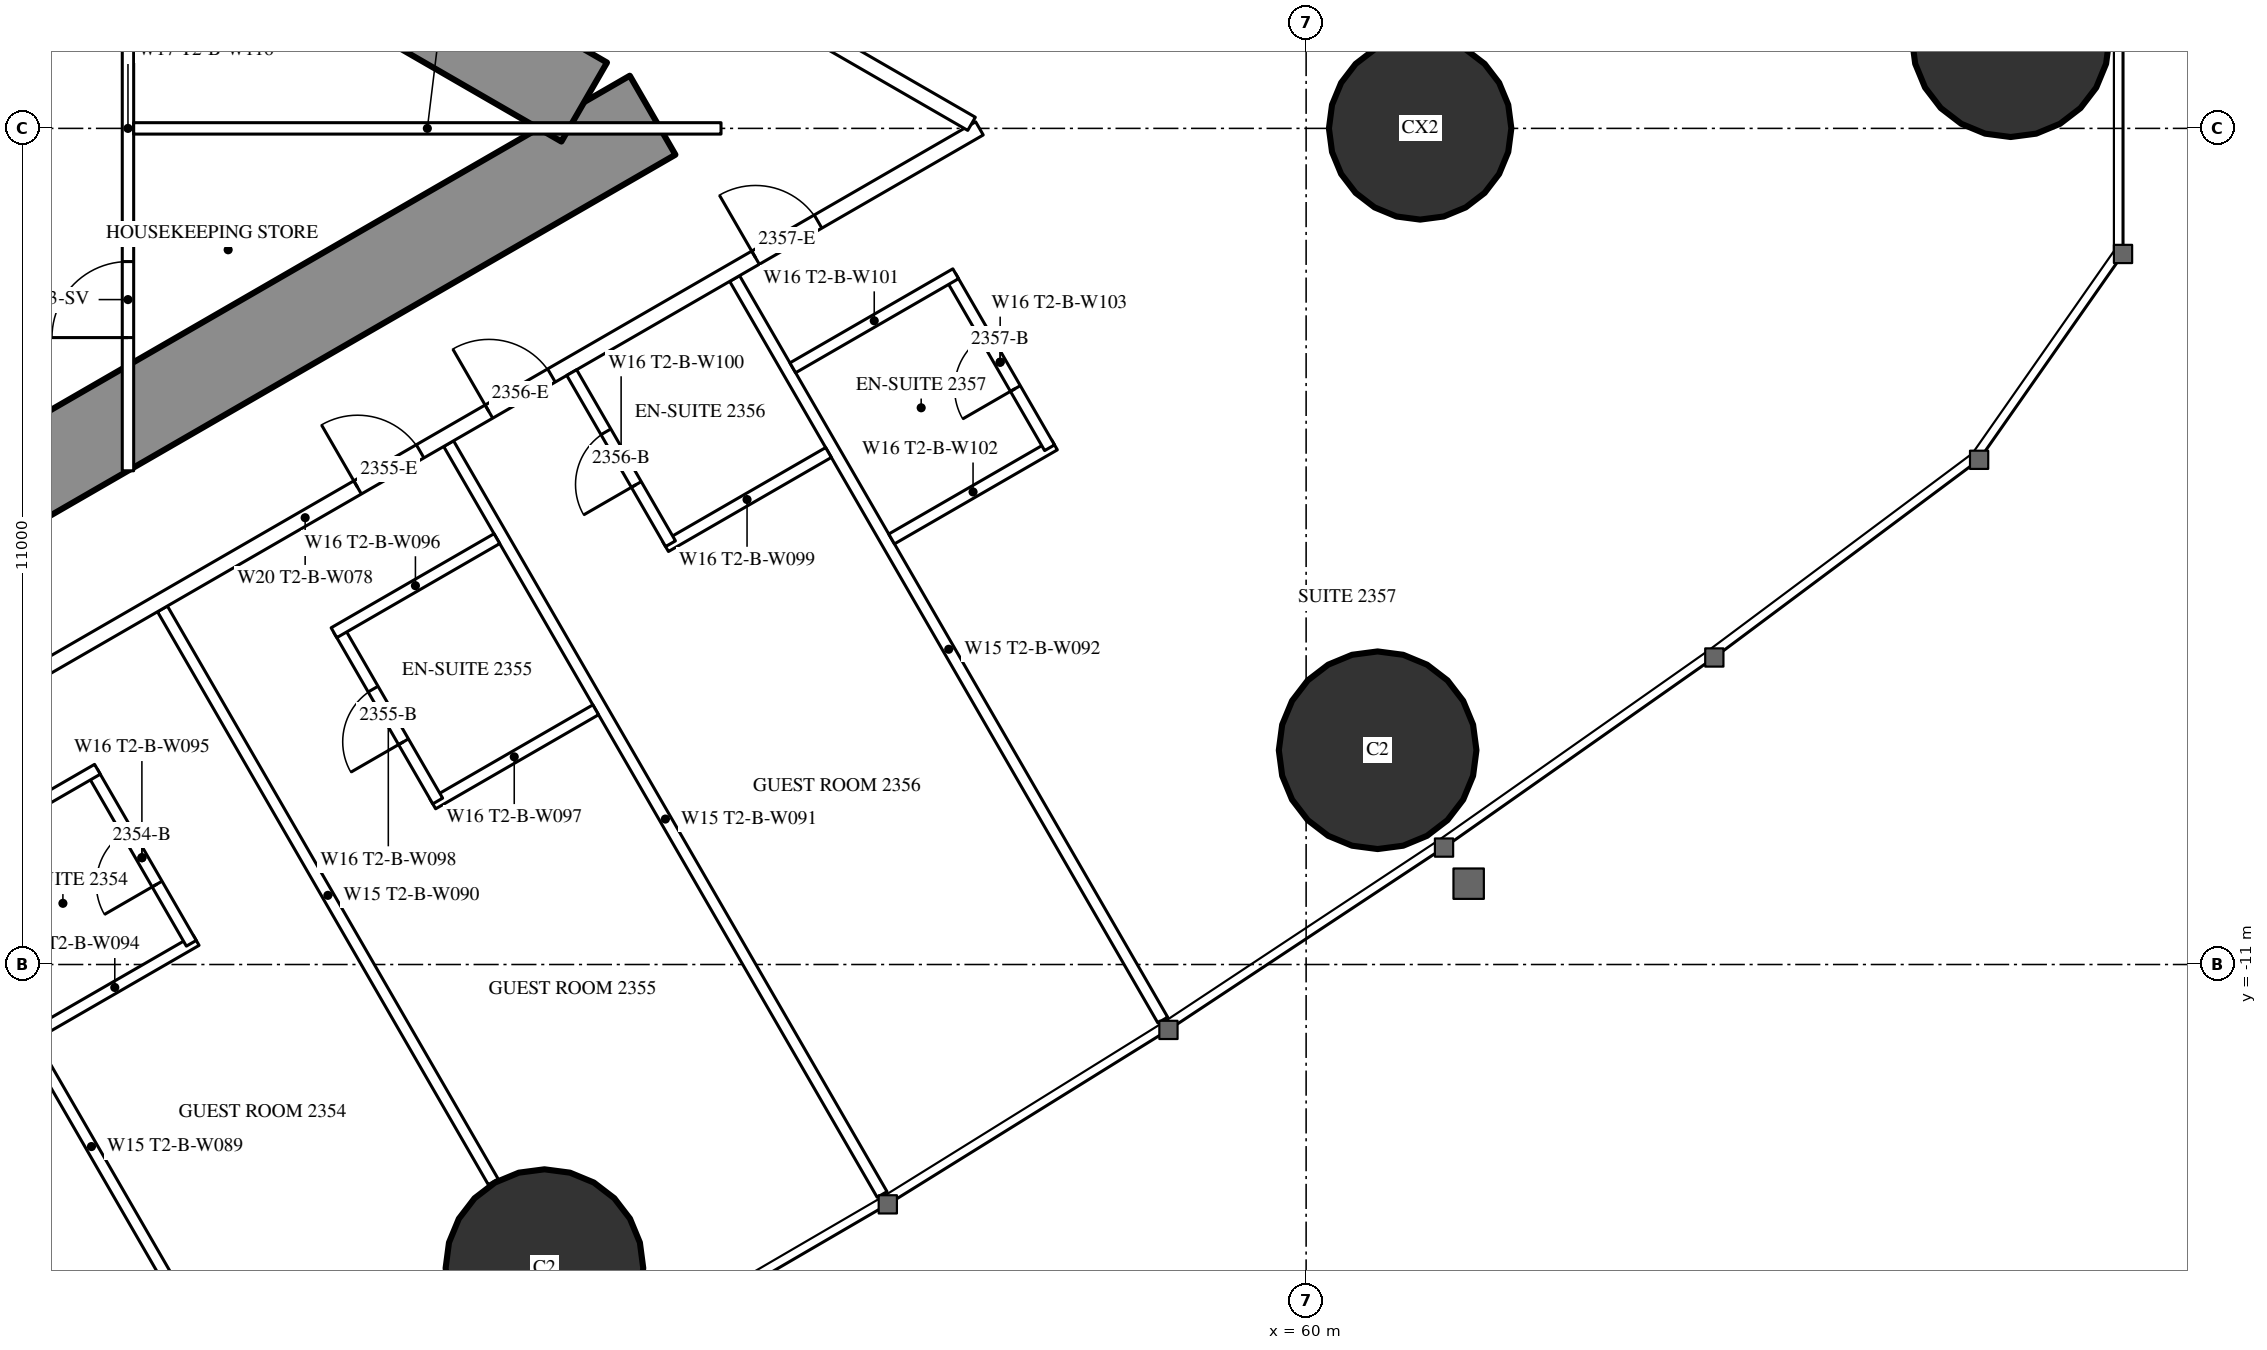
"""IFC4 building model, lengths in metres.
Left out: names, types, materials, properties, quantities, classifications, styles, units other than length and angle.
Written with IfcOpenShell. Run it as: python <this file> out.ifc"""

import sys

from ifc_helpers import new_model, si_unit, direction, frame, frame_2d, origin, origin_2d, place, context, subcontext, project, spatial, rectangle, circle, hollow_circle, extrude, element, fill, save


model = new_model("IFC4")
c1 = context("Model", 3, precision=1e-05, world=origin(), true_north=direction((0.0, 1.0)))
c2 = subcontext(c1, "Body", "Model", "MODEL_VIEW")
j1 = project(units=[si_unit("LENGTHUNIT", "METRE"), si_unit("PLANEANGLEUNIT", "RADIAN")], contexts=[c1])
p1 = place(None, origin())
s1 = spatial("IfcSite", under=j1, at=p1, CompositionType="ELEMENT")
p2 = place(p1, origin())
s2 = spatial("IfcBuilding", under=s1, at=p2, CompositionType="ELEMENT")
p3 = place(p2, frame((0.0, 0.0, 90.6)))
s3 = spatial("IfcBuildingStorey", under=s2, at=p3, CompositionType="ELEMENT", Elevation=90.6)
for number, where, z_axis, x_axis in (
    (1, (69.269, 1.187, 0.0), (0.0, 0.0, 1.0), (1.0, 0.0, 0.0)),
    (2, (49.979, -14.994, 0.0), (0.0, 0.0, 1.0), (1.0, 0.0, 0.0)),
    (3, (60.941, -8.181, 0.0), (0.0, 0.0, 1.0), (1.0, 0.0, 0.0)),
):
    element("IfcColumn", number, at=place(p3, frame(where, z_axis=z_axis, x_axis=x_axis)), inside=s3, PredefinedType="COLUMN", context=c2, shape_type="SweptSolid", body=[
        extrude(hollow_circle(Radius=1.3, WallThickness=0.1, at=origin_2d()), origin(), (0.0, 0.0, 1.0), 3.5),
    ])
p4 = place(p3, frame((61.5, 0.0, 0.0), z_axis=(0.0, 0.0, 1.0), x_axis=(1.0, 0.0, 0.0)))
e4 = element("IfcColumn", 4, at=p4, inside=s3, PredefinedType="COLUMN", context=c2, shape_type="SweptSolid", body=[
    extrude(circle(Radius=1.2, at=origin_2d()), origin(), (0.0, 0.0, 1.0), 3.5),
])
p5 = place(p3, frame((27.2, -13.8, 0.0), z_axis=(0.0, 0.0, 1.0), x_axis=(0.866027159892, 0.499996958321, 0.0)))
e5 = element("IfcWall", 5, at=p5, inside=s3, PredefinedType="SHEAR", context=c2, shape_type="SweptSolid", body=[
    extrude(rectangle(XDim=27.947, YDim=1.2, at=frame_2d((13.973, 0.0))), origin(), (0.0, 0.0, 1.0), 3.5),
])
p6 = place(p5, frame((4.6, 0.0, 0.0)))
e6 = element("IfcOpeningElement", 6, at=p6, cuts=e5, PredefinedType="OPENING", context=c2, shape_type="SweptSolid", body=[
    extrude(rectangle(XDim=1.0, YDim=2.2, at=frame_2d((0.5, 1.1))), frame((0.0, 0.61, 0.0), z_axis=(0.0, -1.0, 0.0), x_axis=(1.0, 0.0, 0.0)), (0.0, 0.0, 1.0), 1.22),
])
p7 = place(p5, frame((13.395, 0.0, 0.0)))
e7 = element("IfcOpeningElement", 7, at=p7, cuts=e5, PredefinedType="OPENING", context=c2, shape_type="SweptSolid", body=[
    extrude(rectangle(XDim=1.8, YDim=2.2, at=frame_2d((0.9, 1.1))), frame((0.0, 0.61, 0.0), z_axis=(0.0, -1.0, 0.0), x_axis=(1.0, 0.0, 0.0)), (0.0, 0.0, 1.0), 1.22),
])
p8 = place(p3, frame((27.2, 13.8, 0.0), z_axis=(0.0, 0.0, 1.0), x_axis=(0.866024515034, -0.500001539357, 0.0)))
e8 = element("IfcWall", 8, at=p8, inside=s3, PredefinedType="SHEAR", context=c2, shape_type="SweptSolid", body=[
    extrude(rectangle(XDim=26.907, YDim=1.2, at=frame_2d((13.454, 0.0))), origin(), (0.0, 0.0, 1.0), 3.5),
])
p9 = place(p8, frame((4.6, 0.0, 0.0)))
e9 = element("IfcOpeningElement", 9, at=p9, cuts=e8, PredefinedType="OPENING", context=c2, shape_type="SweptSolid", body=[
    extrude(rectangle(XDim=1.0, YDim=2.2, at=frame_2d((0.5, 1.1))), frame((0.0, 0.61, 0.0), z_axis=(0.0, -1.0, 0.0), x_axis=(1.0, 0.0, 0.0)), (0.0, 0.0, 1.0), 1.22),
])
p10 = place(p8, frame((13.395, 0.0, 0.0)))
e10 = element("IfcOpeningElement", 10, at=p10, cuts=e8, PredefinedType="OPENING", context=c2, shape_type="SweptSolid", body=[
    extrude(rectangle(XDim=1.8, YDim=2.2, at=frame_2d((0.9, 1.1))), frame((0.0, 0.61, 0.0), z_axis=(0.0, -1.0, 0.0), x_axis=(1.0, 0.0, 0.0)), (0.0, 0.0, 1.0), 1.22),
])
p11 = place(p3, frame((41.19, -8.494, 0.0), z_axis=(0.0, 0.0, 1.0), x_axis=(0.49999258054, -0.866029687369, 0.0)))
e11 = element("IfcWall", 11, at=p11, inside=s3, PredefinedType="PARTITIONING", context=c2, shape_type="SweptSolid", body=[
    extrude(rectangle(XDim=11.318, YDim=0.15, at=frame_2d((5.659, 0.0))), origin(), (0.0, 0.0, 1.0), 3.25),
])
p12 = place(p3, frame((44.954, -6.321, 0.0), z_axis=(0.0, 0.0, 1.0), x_axis=(0.500018676722, -0.866014620505, 0.0)))
e12 = element("IfcWall", 12, at=p12, inside=s3, PredefinedType="PARTITIONING", context=c2, shape_type="SweptSolid", body=[
    extrude(rectangle(XDim=8.704, YDim=0.15, at=frame_2d((4.352, 0.0))), origin(), (0.0, 0.0, 1.0), 2.2),
])
p13 = place(p3, frame((48.719, -4.147, 0.0), z_axis=(0.0, 0.0, 1.0), x_axis=(0.499990498062, -0.866030889661, 0.0)))
e13 = element("IfcWall", 13, at=p13, inside=s3, PredefinedType="PARTITIONING", context=c2, shape_type="SweptSolid", body=[
    extrude(rectangle(XDim=11.406, YDim=0.15, at=frame_2d((5.703, 0.0))), origin(), (0.0, 0.0, 1.0), 3.25),
])
p14 = place(p3, frame((52.481, -1.975, 0.0), z_axis=(0.0, 0.0, 1.0), x_axis=(0.500003867771, -0.866023170714, 0.0)))
e14 = element("IfcWall", 14, at=p14, inside=s3, PredefinedType="PARTITIONING", context=c2, shape_type="SweptSolid", body=[
    extrude(rectangle(XDim=11.265, YDim=0.15, at=frame_2d((5.632, 0.0))), origin(), (0.0, 0.0, 1.0), 3.25),
])
p15 = place(p3, frame((37.96, -10.243, 0.0), z_axis=(0.0, 0.0, 1.0), x_axis=(0.866026429433, 0.499998223521, 0.0)))
e15 = element("IfcWall", 15, at=p15, inside=s3, PredefinedType="PARTITIONING", context=c2, shape_type="SweptSolid", body=[
    extrude(rectangle(XDim=20.487, YDim=0.2, at=frame_2d((10.243, 0.0))), origin(), (0.0, 0.0, 1.0), 3.25),
])
p16 = place(p15, frame((4.047, 0.0, 0.0)))
e16 = element("IfcOpeningElement", 16, at=p16, cuts=e15, PredefinedType="OPENING", context=c2, shape_type="SweptSolid", body=[
    extrude(rectangle(XDim=0.95, YDim=2.2, at=frame_2d((0.475, 1.1))), frame((0.0, 0.11, 0.0), z_axis=(0.0, -1.0, 0.0), x_axis=(1.0, 0.0, 0.0)), (0.0, 0.0, 1.0), 0.22),
])
p17 = place(p15, frame((11.04, 0.0, 0.0)))
e17 = element("IfcOpeningElement", 17, at=p17, cuts=e15, PredefinedType="OPENING", context=c2, shape_type="SweptSolid", body=[
    extrude(rectangle(XDim=0.95, YDim=2.2, at=frame_2d((0.475, 1.1))), frame((0.0, 0.11, 0.0), z_axis=(0.0, -1.0, 0.0), x_axis=(1.0, 0.0, 0.0)), (0.0, 0.0, 1.0), 0.22),
])
p18 = place(p15, frame((13.035, 0.0, 0.0)))
e18 = element("IfcOpeningElement", 18, at=p18, cuts=e15, PredefinedType="OPENING", context=c2, shape_type="SweptSolid", body=[
    extrude(rectangle(XDim=0.95, YDim=2.2, at=frame_2d((0.475, 1.1))), frame((0.0, 0.11, 0.0), z_axis=(0.0, -1.0, 0.0), x_axis=(1.0, 0.0, 0.0)), (0.0, 0.0, 1.0), 0.22),
])
p19 = place(p15, frame((17.085, 0.0, 0.0)))
e19 = element("IfcOpeningElement", 19, at=p19, cuts=e15, PredefinedType="OPENING", context=c2, shape_type="SweptSolid", body=[
    extrude(rectangle(XDim=0.95, YDim=2.2, at=frame_2d((0.475, 1.1))), frame((0.0, 0.11, 0.0), z_axis=(0.0, -1.0, 0.0), x_axis=(1.0, 0.0, 0.0)), (0.0, 0.0, 1.0), 0.22),
])
p20 = place(p15, frame((1.048, 0.0, 0.0)))
e20 = element("IfcOpeningElement", 20, at=p20, cuts=e15, PredefinedType="OPENING", context=c2, shape_type="SweptSolid", body=[
    extrude(rectangle(XDim=1.8, YDim=2.2, at=frame_2d((0.9, 1.1))), frame((0.0, 0.11, 0.0), z_axis=(0.0, -1.0, 0.0), x_axis=(1.0, 0.0, 0.0)), (0.0, 0.0, 1.0), 0.22),
])
p21 = place(p3, frame((36.834, 10.894, 0.0), z_axis=(0.0, 0.0, 1.0), x_axis=(0.866028157229, -0.499995230863, 0.0)))
e21 = element("IfcWall", 21, at=p21, inside=s3, PredefinedType="PARTITIONING", context=c2, shape_type="SweptSolid", body=[
    extrude(rectangle(XDim=21.667, YDim=0.2, at=frame_2d((10.833, 0.0))), origin(), (0.0, 0.0, 1.0), 3.25),
])
p22 = place(p21, frame((14.04, 0.0, 0.0)))
e22 = element("IfcOpeningElement", 22, at=p22, cuts=e21, PredefinedType="OPENING", context=c2, shape_type="SweptSolid", body=[
    extrude(rectangle(XDim=0.95, YDim=2.2, at=frame_2d((0.475, 1.1))), frame((0.0, 0.11, 0.0), z_axis=(0.0, -1.0, 0.0), x_axis=(1.0, 0.0, 0.0)), (0.0, 0.0, 1.0), 0.22),
])
p23 = place(p21, frame((9.99, 0.0, 0.0)))
e23 = element("IfcOpeningElement", 23, at=p23, cuts=e21, PredefinedType="OPENING", context=c2, shape_type="SweptSolid", body=[
    extrude(rectangle(XDim=0.95, YDim=2.2, at=frame_2d((0.475, 1.1))), frame((0.0, 0.11, 0.0), z_axis=(0.0, -1.0, 0.0), x_axis=(1.0, 0.0, 0.0)), (0.0, 0.0, 1.0), 0.22),
])
p24 = place(p21, frame((3.35, 0.0, 0.0)))
e24 = element("IfcOpeningElement", 24, at=p24, cuts=e21, PredefinedType="OPENING", context=c2, shape_type="SweptSolid", body=[
    extrude(rectangle(XDim=1.0, YDim=2.2, at=frame_2d((0.5, 1.1))), frame((0.0, 0.11, 0.0), z_axis=(0.0, -1.0, 0.0), x_axis=(1.0, 0.0, 0.0)), (0.0, 0.0, 1.0), 0.22),
])
p25 = place(p3, frame((43.255, -11.921, 0.0), z_axis=(0.0, 0.0, 1.0), x_axis=(0.866006523861, 0.500032699561, 0.0)))
e25 = element("IfcWall", 25, at=p25, inside=s3, PredefinedType="PARTITIONING", context=c2, shape_type="SweptSolid", body=[
    extrude(rectangle(XDim=2.475, YDim=0.15, at=frame_2d((1.237, 0.0))), origin(), (0.0, 0.0, 1.0), 3.25),
])
p26 = place(p3, frame((44.033, -8.469, 0.0), z_axis=(0.0, 0.0, 1.0), x_axis=(0.500047596559, -0.865997922154, 0.0)))
e26 = element("IfcWall", 26, at=p26, inside=s3, PredefinedType="PARTITIONING", context=c2, shape_type="SweptSolid", body=[
    extrude(rectangle(XDim=2.6, YDim=0.15, at=frame_2d((1.3, 0.0))), origin(), (0.0, 0.0, 1.0), 3.25),
])
p27 = place(p26, frame((0.9, 0.0, 0.0)))
e27 = element("IfcOpeningElement", 27, at=p27, cuts=e26, PredefinedType="OPENING", context=c2, shape_type="SweptSolid", body=[
    extrude(rectangle(XDim=0.8, YDim=2.2, at=frame_2d((0.4, 1.1))), frame((0.0, 0.085, 0.0), z_axis=(0.0, -1.0, 0.0), x_axis=(1.0, 0.0, 0.0)), (0.0, 0.0, 1.0), 0.17),
])
p28 = place(p3, frame((41.955, -9.669, 0.0), z_axis=(0.0, 0.0, 1.0), x_axis=(0.866006523861, 0.500032699561, 0.0)))
e28 = element("IfcWall", 28, at=p28, inside=s3, PredefinedType="PARTITIONING", context=c2, shape_type="SweptSolid", body=[
    extrude(rectangle(XDim=2.475, YDim=0.15, at=frame_2d((1.237, 0.0))), origin(), (0.0, 0.0, 1.0), 3.25),
])
p29 = place(p3, frame((48.51, -8.887, 0.0), z_axis=(0.0, 0.0, 1.0), x_axis=(0.866031185235, 0.4999899861, 0.0)))
e29 = element("IfcWall", 29, at=p29, inside=s3, PredefinedType="PARTITIONING", context=c2, shape_type="SweptSolid", body=[
    extrude(rectangle(XDim=2.475, YDim=0.15, at=frame_2d((1.238, 0.0))), origin(), (0.0, 0.0, 1.0), 3.25),
])
p30 = place(p3, frame((47.275, -6.597, 0.0), z_axis=(0.0, 0.0, 1.0), x_axis=(0.499936506574, -0.866062058628, 0.0)))
e30 = element("IfcWall", 30, at=p30, inside=s3, PredefinedType="PARTITIONING", context=c2, shape_type="SweptSolid", body=[
    extrude(rectangle(XDim=2.6, YDim=0.15, at=frame_2d((1.3, 0.0))), origin(), (0.0, 0.0, 1.0), 3.25),
])
p31 = place(p30, frame((0.9, 0.0, 0.0)))
e31 = element("IfcOpeningElement", 31, at=p31, cuts=e30, PredefinedType="OPENING", context=c2, shape_type="SweptSolid", body=[
    extrude(rectangle(XDim=0.8, YDim=2.2, at=frame_2d((0.4, 1.1))), frame((0.0, 0.085, 0.0), z_axis=(0.0, -1.0, 0.0), x_axis=(1.0, 0.0, 0.0)), (0.0, 0.0, 1.0), 0.17),
])
for number, where, z_axis, x_axis in (
    (32, (47.21, -6.635, 0.0), (0.0, 0.0, 1.0), (0.866, 0.5, 0.0)),
    (33, (51.573, -5.502, 0.0), (0.0, 0.0, 1.0), (0.866, 0.5, 0.0)),
):
    element("IfcWall", number, at=place(p3, frame(where, z_axis=z_axis, x_axis=x_axis)), inside=s3, PredefinedType="PARTITIONING", context=c2, shape_type="SweptSolid", body=[
        extrude(rectangle(XDim=2.475, YDim=0.15, at=frame_2d((1.237, 0.0))), origin(), (0.0, 0.0, 1.0), 3.25),
    ])
p32 = place(p3, frame((50.338, -3.213, 0.0), z_axis=(0.0, 0.0, 1.0), x_axis=(0.500047596559, -0.865997922154, 0.0)))
e34 = element("IfcWall", 34, at=p32, inside=s3, PredefinedType="PARTITIONING", context=c2, shape_type="SweptSolid", body=[
    extrude(rectangle(XDim=2.6, YDim=0.15, at=frame_2d((1.3, 0.0))), origin(), (0.0, 0.0, 1.0), 3.25),
])
p33 = place(p32, frame((0.9, 0.0, 0.0)))
e35 = element("IfcOpeningElement", 35, at=p33, cuts=e34, PredefinedType="OPENING", context=c2, shape_type="SweptSolid", body=[
    extrude(rectangle(XDim=0.8, YDim=2.2, at=frame_2d((0.4, 1.1))), frame((0.0, 0.085, 0.0), z_axis=(0.0, -1.0, 0.0), x_axis=(1.0, 0.0, 0.0)), (0.0, 0.0, 1.0), 0.17),
])
p34 = place(p3, frame((54.546, -5.402, 0.0), z_axis=(0.0, 0.0, 1.0), x_axis=(0.866006523861, 0.500032699561, 0.0)))
e36 = element("IfcWall", 36, at=p34, inside=s3, PredefinedType="PARTITIONING", context=c2, shape_type="SweptSolid", body=[
    extrude(rectangle(XDim=2.475, YDim=0.15, at=frame_2d((1.237, 0.0))), origin(), (0.0, 0.0, 1.0), 3.25),
])
p35 = place(p3, frame((55.325, -1.95, 0.0), z_axis=(0.0, 0.0, 1.0), x_axis=(0.500006934395, -0.866021400173, 0.0)))
e37 = element("IfcWall", 37, at=p35, inside=s3, PredefinedType="PARTITIONING", context=c2, shape_type="SweptSolid", body=[
    extrude(rectangle(XDim=2.6, YDim=0.15, at=frame_2d((1.3, 0.0))), origin(), (0.0, 0.0, 1.0), 3.25),
])
p36 = place(p35, frame((0.9, 0.0, 0.0)))
e38 = element("IfcOpeningElement", 38, at=p36, cuts=e37, PredefinedType="OPENING", context=c2, shape_type="SweptSolid", body=[
    extrude(rectangle(XDim=0.8, YDim=2.2, at=frame_2d((0.4, 1.1))), frame((0.0, 0.085, 0.0), z_axis=(0.0, -1.0, 0.0), x_axis=(1.0, 0.0, 0.0)), (0.0, 0.0, 1.0), 0.17),
])
p37 = place(p3, frame((53.246, -3.15, 0.0), z_axis=(0.0, 0.0, 1.0), x_axis=(0.866006523861, 0.500032699561, 0.0)))
e39 = element("IfcWall", 39, at=p37, inside=s3, PredefinedType="PARTITIONING", context=c2, shape_type="SweptSolid", body=[
    extrude(rectangle(XDim=2.475, YDim=0.15, at=frame_2d((1.237, 0.0))), origin(), (0.0, 0.0, 1.0), 3.25),
])
p38 = place(p3, frame((44.5, -4.505, 0.0), z_axis=(0.0, 0.0, 1.0), x_axis=(0.0, 1.0, 0.0)))
e40 = element("IfcWall", 40, at=p38, inside=s3, PredefinedType="PARTITIONING", context=c2, shape_type="SweptSolid", body=[
    extrude(rectangle(XDim=9.009, YDim=0.15, at=frame_2d((4.505, 0.0))), origin(), (0.0, 0.0, 1.0), 2.45),
])
p39 = place(p38, frame((1.752, 0.0, 0.0)))
e41 = element("IfcOpeningElement", 41, at=p39, cuts=e40, PredefinedType="OPENING", context=c2, shape_type="SweptSolid", body=[
    extrude(rectangle(XDim=1.0, YDim=2.2, at=frame_2d((0.5, 1.1))), frame((0.0, 0.085, 0.0), z_axis=(0.0, -1.0, 0.0), x_axis=(1.0, 0.0, 0.0)), (0.0, 0.0, 1.0), 0.17),
])
p40 = place(p38, frame((6.257, 0.0, 0.0)))
e42 = element("IfcOpeningElement", 42, at=p40, cuts=e40, PredefinedType="OPENING", context=c2, shape_type="SweptSolid", body=[
    extrude(rectangle(XDim=1.0, YDim=2.2, at=frame_2d((0.5, 1.1))), frame((0.0, 0.085, 0.0), z_axis=(0.0, -1.0, 0.0), x_axis=(1.0, 0.0, 0.0)), (0.0, 0.0, 1.0), 0.17),
])
p41 = place(p3, frame((44.575, 0.0, 0.0), z_axis=(0.0, 0.0, 1.0), x_axis=(1.0, 0.0, 0.0)))
e43 = element("IfcWall", 43, at=p41, inside=s3, PredefinedType="PARTITIONING", context=c2, shape_type="SweptSolid", body=[
    extrude(rectangle(XDim=7.727, YDim=0.15, at=frame_2d((3.864, 0.0))), origin(), (0.0, 0.0, 1.0), 2.2),
])
p42 = place(p27, origin())
e44 = element("IfcDoor", 44, at=p42, inside=s3, OperationType="SINGLE_SWING_RIGHT", PredefinedType="DOOR", context=c2, shape_type="SweptSolid", body=[
    extrude(rectangle(XDim=0.8, YDim=2.2, at=frame_2d((0.4, 1.1))), frame((0.0, 0.025, 0.0), z_axis=(0.0, -1.0, 0.0), x_axis=(1.0, 0.0, 0.0)), (0.0, 0.0, 1.0), 0.05),
])
fill(e27, e44)
p43 = place(p31, origin())
e45 = element("IfcDoor", 45, at=p43, inside=s3, OperationType="SINGLE_SWING_RIGHT", PredefinedType="DOOR", context=c2, shape_type="SweptSolid", body=[
    extrude(rectangle(XDim=0.8, YDim=2.2, at=frame_2d((0.4, 1.1))), frame((0.0, 0.025, 0.0), z_axis=(0.0, -1.0, 0.0), x_axis=(1.0, 0.0, 0.0)), (0.0, 0.0, 1.0), 0.05),
])
fill(e31, e45)
p44 = place(p17, origin())
e46 = element("IfcDoor", 46, at=p44, inside=s3, OperationType="SINGLE_SWING_LEFT", PredefinedType="DOOR", context=c2, shape_type="SweptSolid", body=[
    extrude(rectangle(XDim=0.95, YDim=2.2, at=frame_2d((0.475, 1.1))), frame((0.0, 0.025, 0.0), z_axis=(0.0, -1.0, 0.0), x_axis=(1.0, 0.0, 0.0)), (0.0, 0.0, 1.0), 0.05),
])
fill(e17, e46)
p45 = place(p33, origin())
e47 = element("IfcDoor", 47, at=p45, inside=s3, OperationType="SINGLE_SWING_RIGHT", PredefinedType="DOOR", context=c2, shape_type="SweptSolid", body=[
    extrude(rectangle(XDim=0.8, YDim=2.2, at=frame_2d((0.4, 1.1))), frame((0.0, 0.025, 0.0), z_axis=(0.0, -1.0, 0.0), x_axis=(1.0, 0.0, 0.0)), (0.0, 0.0, 1.0), 0.05),
])
fill(e35, e47)
p46 = place(p18, origin())
e48 = element("IfcDoor", 48, at=p46, inside=s3, OperationType="SINGLE_SWING_LEFT", PredefinedType="DOOR", context=c2, shape_type="SweptSolid", body=[
    extrude(rectangle(XDim=0.95, YDim=2.2, at=frame_2d((0.475, 1.1))), frame((0.0, 0.025, 0.0), z_axis=(0.0, -1.0, 0.0), x_axis=(1.0, 0.0, 0.0)), (0.0, 0.0, 1.0), 0.05),
])
fill(e18, e48)
p47 = place(p36, origin())
e49 = element("IfcDoor", 49, at=p47, inside=s3, OperationType="SINGLE_SWING_RIGHT", PredefinedType="DOOR", context=c2, shape_type="SweptSolid", body=[
    extrude(rectangle(XDim=0.8, YDim=2.2, at=frame_2d((0.4, 1.1))), frame((0.0, 0.025, 0.0), z_axis=(0.0, -1.0, 0.0), x_axis=(1.0, 0.0, 0.0)), (0.0, 0.0, 1.0), 0.05),
])
fill(e38, e49)
p48 = place(p19, origin())
e50 = element("IfcDoor", 50, at=p48, inside=s3, OperationType="SINGLE_SWING_LEFT", PredefinedType="DOOR", context=c2, shape_type="SweptSolid", body=[
    extrude(rectangle(XDim=0.95, YDim=2.2, at=frame_2d((0.475, 1.1))), frame((0.0, 0.025, 0.0), z_axis=(0.0, -1.0, 0.0), x_axis=(1.0, 0.0, 0.0)), (0.0, 0.0, 1.0), 0.05),
])
fill(e19, e50)
p49 = place(p39, origin())
e51 = element("IfcDoor", 51, at=p49, inside=s3, OperationType="SINGLE_SWING_LEFT", PredefinedType="DOOR", context=c2, shape_type="SweptSolid", body=[
    extrude(rectangle(XDim=1.0, YDim=2.2, at=frame_2d((0.5, 1.1))), frame((0.0, 0.025, 0.0), z_axis=(0.0, -1.0, 0.0), x_axis=(1.0, 0.0, 0.0)), (0.0, 0.0, 1.0), 0.05),
])
fill(e41, e51)
save(model, sys.argv[1])
